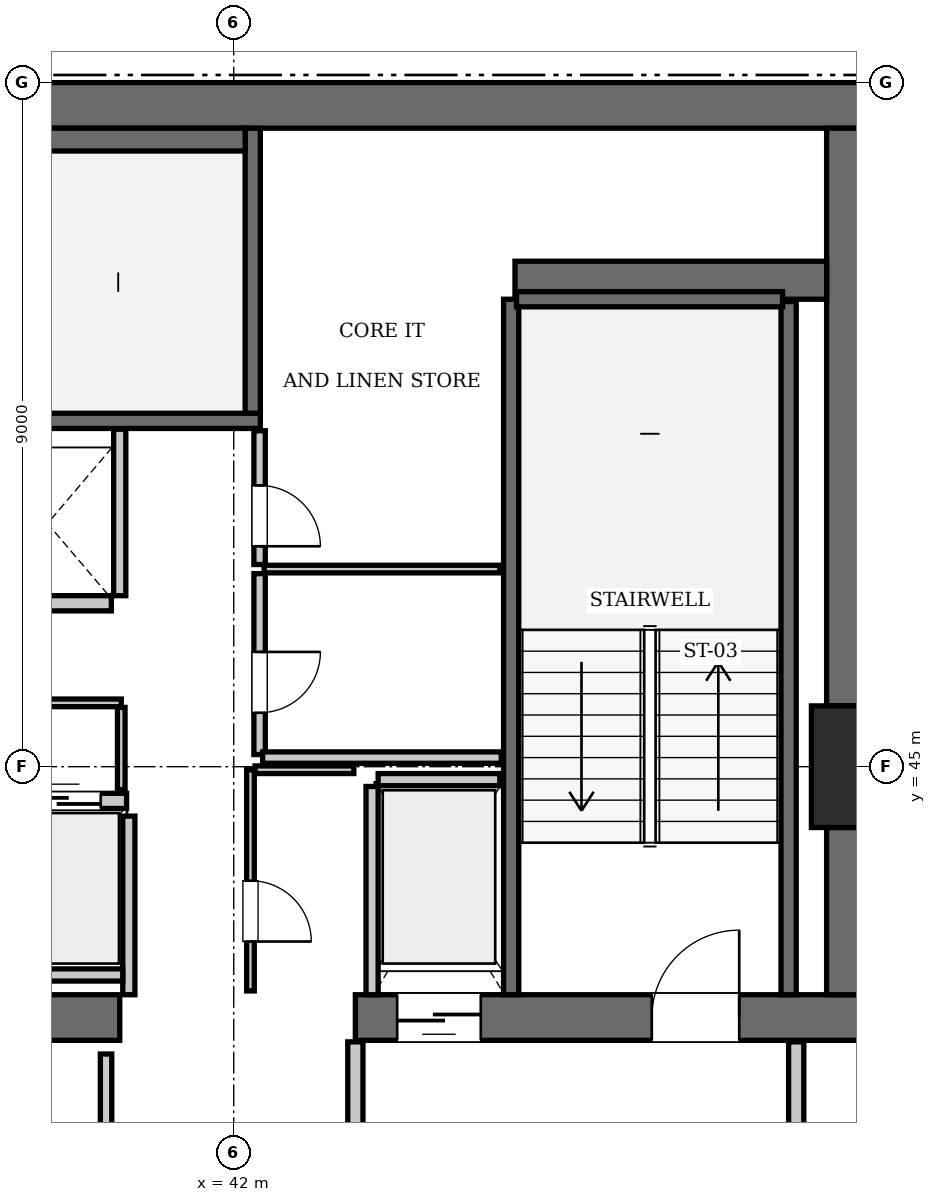
"""IFC4 building model, lengths in metres.
Left out: names, types, materials, properties, quantities, classifications, styles, units other than length and angle.
Written with IfcOpenShell. Run it as: python <this file> out.ifc"""

import sys

from ifc_helpers import new_model, si_unit, direction, frame, frame_2d, origin, origin_2d, place, context, subcontext, project, spatial, rectangle, extrude, element, fill, save


model = new_model("IFC4")
c1 = context("Model", 3, precision=1e-05, world=origin(), true_north=direction((0.0, 1.0)))
c2 = subcontext(c1, "Body", "Model", "MODEL_VIEW")
j1 = project(units=[si_unit("LENGTHUNIT", "METRE"), si_unit("PLANEANGLEUNIT", "RADIAN")], contexts=[c1])
p1 = place(None, origin())
s1 = spatial("IfcSite", under=j1, at=p1, CompositionType="ELEMENT")
p2 = place(p1, origin())
s2 = spatial("IfcBuilding", under=s1, at=p2, CompositionType="ELEMENT")
p3 = place(p2, frame((0.0, 0.0, 301.0)))
s3 = spatial("IfcBuildingStorey", under=s2, at=p3, CompositionType="ELEMENT", Elevation=301.0)
p4 = place(p3, frame((50.4, 45.0, 0.0), z_axis=(0.0, 0.0, 1.0), x_axis=(1.0, 0.0, 0.0)))
e1 = element("IfcColumn", 1, at=p4, inside=s3, PredefinedType="COLUMN", context=c2, shape_type="SweptSolid", body=[
    extrude(rectangle(XDim=1.6, YDim=1.6, at=origin_2d()), origin(), (0.0, 0.0, 1.0), 3.85),
])
p5 = place(p3, frame((25.2, 53.7, 0.0), z_axis=(0.0, 0.0, 1.0), x_axis=(1.0, 0.0, 0.0)))
e2 = element("IfcWall", 2, at=p5, inside=s3, PredefinedType="SHEAR", context=c2, shape_type="SweptSolid", body=[
    extrude(rectangle(XDim=25.2, YDim=0.6, at=frame_2d((12.6, 0.0))), origin(), (0.0, 0.0, 1.0), 3.85),
])
p6 = place(p3, frame((35.1, 41.7, 0.0), z_axis=(0.0, 0.0, 1.0), x_axis=(1.0, 0.0, 0.0)))
e3 = element("IfcWall", 3, at=p6, inside=s3, PredefinedType="SHEAR", context=c2, shape_type="SweptSolid", body=[
    extrude(rectangle(XDim=5.4, YDim=0.6, at=frame_2d((2.7, 0.0))), origin(), (0.0, 0.0, 1.0), 3.85),
])
p7 = place(p3, frame((43.6, 41.7, 0.0), z_axis=(0.0, 0.0, 1.0), x_axis=(1.0, 0.0, 0.0)))
e4 = element("IfcWall", 4, at=p7, inside=s3, PredefinedType="SHEAR", context=c2, shape_type="SweptSolid", body=[
    extrude(rectangle(XDim=6.8, YDim=0.6, at=frame_2d((3.4, 0.0))), origin(), (0.0, 0.0, 1.0), 3.85),
])
p8 = place(p7, frame((3.9, 0.0, 0.0)))
e5 = element("IfcOpeningElement", 5, at=p8, cuts=e4, PredefinedType="OPENING", context=c2, shape_type="SweptSolid", body=[
    extrude(rectangle(XDim=1.15, YDim=2.15, at=frame_2d((0.575, 1.075))), frame((0.0, 0.31, 0.0), z_axis=(0.0, -1.0, 0.0), x_axis=(1.0, 0.0, 0.0)), (0.0, 0.0, 1.0), 0.62),
])
p9 = place(p7, frame((0.55, 0.0, 0.0)))
e6 = element("IfcOpeningElement", 6, at=p9, cuts=e4, PredefinedType="OPENING", context=c2, shape_type="SweptSolid", body=[
    extrude(rectangle(XDim=1.1, YDim=2.2, at=frame_2d((0.55, 1.1))), frame((0.0, 0.31, 0.0), z_axis=(0.0, -1.0, 0.0), x_axis=(1.0, 0.0, 0.0)), (0.0, 0.0, 1.0), 0.62),
])
p10 = place(p3, frame((50.1, 42.0, 0.0), z_axis=(0.0, 0.0, 1.0), x_axis=(0.0, 1.0, 0.0)))
e7 = element("IfcWall", 7, at=p10, inside=s3, PredefinedType="SHEAR", context=c2, shape_type="SweptSolid", body=[
    extrude(rectangle(XDim=2.2, YDim=0.6, at=frame_2d((1.1, 0.0))), origin(), (0.0, 0.0, 1.0), 3.85),
])
p11 = place(p3, frame((50.1, 45.8, 0.0), z_axis=(0.0, 0.0, 1.0), x_axis=(0.0, 1.0, 0.0)))
e8 = element("IfcWall", 8, at=p11, inside=s3, PredefinedType="SHEAR", context=c2, shape_type="SweptSolid", body=[
    extrude(rectangle(XDim=7.6, YDim=0.6, at=frame_2d((3.8, 0.0))), origin(), (0.0, 0.0, 1.0), 3.85),
])
p12 = place(p3, frame((45.7, 51.4, 0.0), z_axis=(0.0, 0.0, 1.0), x_axis=(1.0, 0.0, 0.0)))
e9 = element("IfcWall", 9, at=p12, inside=s3, PredefinedType="SHEAR", context=c2, shape_type="SweptSolid", body=[
    extrude(rectangle(XDim=4.1, YDim=0.5, at=frame_2d((2.05, 0.0))), origin(), (0.0, 0.0, 1.0), 3.85),
])
p13 = place(p3, frame((33.25, 49.55, 0.0), z_axis=(0.0, 0.0, 1.0), x_axis=(1.0, 0.0, 0.0)))
e10 = element("IfcWall", 10, at=p13, inside=s3, PredefinedType="SOLIDWALL", context=c2, shape_type="SweptSolid", body=[
    extrude(rectangle(XDim=9.1, YDim=0.2, at=frame_2d((4.55, 0.0))), origin(), (0.0, 0.0, 1.0), 3.61),
])
p14 = place(p3, frame((42.25, 49.65, 0.0), z_axis=(0.0, 0.0, 1.0), x_axis=(0.0, 1.0, 0.0)))
e11 = element("IfcWall", 11, at=p14, inside=s3, PredefinedType="SOLIDWALL", context=c2, shape_type="SweptSolid", body=[
    extrude(rectangle(XDim=3.75, YDim=0.2, at=frame_2d((1.875, 0.0))), origin(), (0.0, 0.0, 1.0), 3.61),
])
p15 = place(p3, frame((33.45, 53.25, 0.0), z_axis=(0.0, 0.0, 1.0), x_axis=(1.0, 0.0, 0.0)))
e12 = element("IfcWall", 12, at=p15, inside=s3, PredefinedType="SOLIDWALL", context=c2, shape_type="SweptSolid", body=[
    extrude(rectangle(XDim=8.7, YDim=0.3, at=frame_2d((4.35, 0.0))), origin(), (0.0, 0.0, 1.0), 3.61),
])
p16 = place(p3, frame((45.65, 42.0, 0.0), z_axis=(0.0, 0.0, 1.0), x_axis=(0.0, 1.0, 0.0)))
e13 = element("IfcWall", 13, at=p16, inside=s3, PredefinedType="SOLIDWALL", context=c2, shape_type="SweptSolid", body=[
    extrude(rectangle(XDim=9.15, YDim=0.2, at=frame_2d((4.575, 0.0))), origin(), (0.0, 0.0, 1.0), 3.61),
])
p17 = place(p3, frame((49.3, 42.0, 0.0), z_axis=(0.0, 0.0, 1.0), x_axis=(0.0, 1.0, 0.0)))
e14 = element("IfcWall", 14, at=p17, inside=s3, PredefinedType="SOLIDWALL", context=c2, shape_type="SweptSolid", body=[
    extrude(rectangle(XDim=9.12, YDim=0.2, at=frame_2d((4.56, 0.0))), origin(), (0.0, 0.0, 1.0), 3.61),
])
p18 = place(p3, frame((45.72, 51.15, 0.0), z_axis=(0.0, 0.0, 1.0), x_axis=(1.0, 0.0, 0.0)))
e15 = element("IfcWall", 15, at=p18, inside=s3, PredefinedType="SOLIDWALL", context=c2, shape_type="SweptSolid", body=[
    extrude(rectangle(XDim=3.5, YDim=0.2, at=frame_2d((1.75, 0.0))), origin(), (0.0, 0.0, 1.0), 3.61),
])
p19 = place(p3, frame((38.91, 44.55, 0.0), z_axis=(0.0, 0.0, 1.0), x_axis=(1.0, 0.0, 0.0)))
e16 = element("IfcWall", 16, at=p19, inside=s3, PredefinedType="SOLIDWALL", context=c2, shape_type="SweptSolid", body=[
    extrude(rectangle(XDim=1.68, YDim=0.2, at=frame_2d((0.84, 0.0))), origin(), (0.0, 0.0, 1.0), 3.61),
])
p20 = place(p19, frame((0.34, 0.0, 0.0)))
e17 = element("IfcOpeningElement", 17, at=p20, cuts=e16, PredefinedType="OPENING", context=c2, shape_type="SweptSolid", body=[
    extrude(rectangle(XDim=1.0, YDim=2.15, at=frame_2d((0.5, 1.075))), frame((0.0, 0.11, 0.0), z_axis=(0.0, -1.0, 0.0), x_axis=(1.0, 0.0, 0.0)), (0.0, 0.0, 1.0), 0.22),
])
p21 = place(p3, frame((38.71, 47.15, 0.0), z_axis=(0.0, 0.0, 1.0), x_axis=(1.0, 0.0, 0.0)))
e18 = element("IfcWall", 18, at=p21, inside=s3, PredefinedType="SOLIDWALL", context=c2, shape_type="SweptSolid", body=[
    extrude(rectangle(XDim=1.68, YDim=0.2, at=frame_2d((0.84, 0.0))), origin(), (0.0, 0.0, 1.0), 3.61),
])
p22 = place(p3, frame((43.9, 44.83, 0.0), z_axis=(0.0, 0.0, 1.0), x_axis=(1.0, 0.0, 0.0)))
e19 = element("IfcWall", 19, at=p22, inside=s3, PredefinedType="SOLIDWALL", context=c2, shape_type="SweptSolid", body=[
    extrude(rectangle(XDim=1.6, YDim=0.16, at=frame_2d((0.8, 0.0))), origin(), (0.0, 0.0, 1.0), 3.61),
])
p23 = place(p3, frame((43.82, 42.0, 0.0), z_axis=(0.0, 0.0, 1.0), x_axis=(0.0, 1.0, 0.0)))
e20 = element("IfcWall", 20, at=p23, inside=s3, PredefinedType="SOLIDWALL", context=c2, shape_type="SweptSolid", body=[
    extrude(rectangle(XDim=2.74, YDim=0.16, at=frame_2d((1.37, 0.0))), origin(), (0.0, 0.0, 1.0), 3.61),
])
p24 = place(p3, frame((40.62, 42.0, 0.0), z_axis=(0.0, 0.0, 1.0), x_axis=(0.0, 1.0, 0.0)))
e21 = element("IfcWall", 21, at=p24, inside=s3, PredefinedType="SOLIDWALL", context=c2, shape_type="SweptSolid", body=[
    extrude(rectangle(XDim=2.35, YDim=0.16, at=frame_2d((1.175, 0.0))), origin(), (0.0, 0.0, 1.0), 3.61),
])
p25 = place(p3, frame((35.52, 42.26, 0.0), z_axis=(0.0, 0.0, 1.0), x_axis=(1.0, 0.0, 0.0)))
e22 = element("IfcWall", 22, at=p25, inside=s3, PredefinedType="SOLIDWALL", context=c2, shape_type="SweptSolid", body=[
    extrude(rectangle(XDim=5.02, YDim=0.16, at=frame_2d((2.51, 0.0))), origin(), (0.0, 0.0, 1.0), 3.61),
])
p26 = place(p3, frame((40.5, 47.25, 0.0), z_axis=(0.0, 0.0, 1.0), x_axis=(0.0, 1.0, 0.0)))
e23 = element("IfcWall", 23, at=p26, inside=s3, PredefinedType="SOLIDWALL", context=c2, shape_type="SweptSolid", body=[
    extrude(rectangle(XDim=2.19, YDim=0.16, at=frame_2d((1.095, 0.0))), origin(), (0.0, 0.0, 1.0), 3.61),
])
for number, where, z_axis, x_axis in (
    (24, (43.6, 38.31, 0.0), (0.0, 0.0, 1.0), (0.0, 1.0, 0.0)),
    (25, (49.4, 38.31, 0.0), (0.0, 0.0, 1.0), (0.0, 1.0, 0.0)),
):
    element("IfcWall", number, at=place(p3, frame(where, z_axis=z_axis, x_axis=x_axis)), inside=s3, PredefinedType="PARTITIONING", context=c2, shape_type="SweptSolid", body=[
        extrude(rectangle(XDim=3.07, YDim=0.2, at=frame_2d((1.535, 0.0))), origin(), (0.0, 0.0, 1.0), 3.61),
    ])
p27 = place(p3, frame((38.02, 45.84, 0.0), z_axis=(0.0, 0.0, 1.0), x_axis=(1.0, 0.0, 0.0)))
e26 = element("IfcWall", 26, at=p27, inside=s3, PredefinedType="PARTITIONING", context=c2, shape_type="SweptSolid", body=[
    extrude(rectangle(XDim=2.5, YDim=0.1, at=frame_2d((1.25, 0.0))), origin(), (0.0, 0.0, 1.0), 3.61),
])
p28 = place(p27, frame((0.75, 0.0, 0.0)))
e27 = element("IfcOpeningElement", 27, at=p28, cuts=e26, PredefinedType="OPENING", context=c2, shape_type="SweptSolid", body=[
    extrude(rectangle(XDim=0.8, YDim=2.05, at=frame_2d((0.4, 1.025))), frame((0.0, 0.06, 0.0), z_axis=(0.0, -1.0, 0.0), x_axis=(1.0, 0.0, 0.0)), (0.0, 0.0, 1.0), 0.12),
])
p29 = place(p3, frame((40.52, 44.7, 0.0), z_axis=(0.0, 0.0, 1.0), x_axis=(0.0, 1.0, 0.0)))
e28 = element("IfcWall", 28, at=p29, inside=s3, PredefinedType="PARTITIONING", context=c2, shape_type="SweptSolid", body=[
    extrude(rectangle(XDim=1.08, YDim=0.1, at=frame_2d((0.54, 0.0))), origin(), (0.0, 0.0, 1.0), 3.61),
])
p30 = place(p3, frame((42.22, 42.05, 0.0), z_axis=(0.0, 0.0, 1.0), x_axis=(0.0, 1.0, 0.0)))
e29 = element("IfcWall", 29, at=p30, inside=s3, PredefinedType="PARTITIONING", context=c2, shape_type="SweptSolid", body=[
    extrude(rectangle(XDim=2.91, YDim=0.1, at=frame_2d((1.455, 0.0))), origin(), (0.0, 0.0, 1.0), 3.61),
])
p31 = place(p30, frame((0.65, 0.0, 0.0)))
e30 = element("IfcOpeningElement", 30, at=p31, cuts=e29, PredefinedType="OPENING", context=c2, shape_type="SweptSolid", body=[
    extrude(rectangle(XDim=0.8, YDim=2.05, at=frame_2d((0.4, 1.025))), frame((0.0, 0.06, 0.0), z_axis=(0.0, -1.0, 0.0), x_axis=(1.0, 0.0, 0.0)), (0.0, 0.0, 1.0), 0.12),
])
p32 = place(p3, frame((42.28, 44.96, 0.0), z_axis=(0.0, 0.0, 1.0), x_axis=(1.0, 0.0, 0.0)))
e31 = element("IfcWall", 31, at=p32, inside=s3, PredefinedType="PARTITIONING", context=c2, shape_type="SweptSolid", body=[
    extrude(rectangle(XDim=1.3, YDim=0.1, at=frame_2d((0.65, 0.0))), origin(), (0.0, 0.0, 1.0), 3.61),
])
p33 = place(p3, frame((42.34, 45.16, 0.0), z_axis=(0.0, 0.0, 1.0), x_axis=(0.0, 1.0, 0.0)))
e32 = element("IfcWall", 32, at=p33, inside=s3, PredefinedType="PARTITIONING", context=c2, shape_type="SweptSolid", body=[
    extrude(rectangle(XDim=2.38, YDim=0.15, at=frame_2d((1.19, 0.0))), origin(), (0.0, 0.0, 1.0), 3.61),
])
p34 = place(p33, frame((0.55, 0.0, 0.0)))
e33 = element("IfcOpeningElement", 33, at=p34, cuts=e32, PredefinedType="OPENING", context=c2, shape_type="SweptSolid", body=[
    extrude(rectangle(XDim=0.8, YDim=2.05, at=frame_2d((0.4, 1.025))), frame((0.0, 0.085, 0.0), z_axis=(0.0, -1.0, 0.0), x_axis=(1.0, 0.0, 0.0)), (0.0, 0.0, 1.0), 0.17),
])
p35 = place(p3, frame((42.34, 47.66, 0.0), z_axis=(0.0, 0.0, 1.0), x_axis=(0.0, 1.0, 0.0)))
e34 = element("IfcWall", 34, at=p35, inside=s3, PredefinedType="PARTITIONING", context=c2, shape_type="SweptSolid", body=[
    extrude(rectangle(XDim=1.76, YDim=0.15, at=frame_2d((0.88, 0.0))), origin(), (0.0, 0.0, 1.0), 3.61),
])
p36 = place(p35, frame((0.24, 0.0, 0.0)))
e35 = element("IfcOpeningElement", 35, at=p36, cuts=e34, PredefinedType="OPENING", context=c2, shape_type="SweptSolid", body=[
    extrude(rectangle(XDim=0.8, YDim=2.05, at=frame_2d((0.4, 1.025))), frame((0.0, 0.085, 0.0), z_axis=(0.0, -1.0, 0.0), x_axis=(1.0, 0.0, 0.0)), (0.0, 0.0, 1.0), 0.17),
])
p37 = place(p3, frame((42.4, 47.6, 0.0), z_axis=(0.0, 0.0, 1.0), x_axis=(1.0, 0.0, 0.0)))
e36 = element("IfcWall", 36, at=p37, inside=s3, PredefinedType="PARTITIONING", context=c2, shape_type="SweptSolid", body=[
    extrude(rectangle(XDim=3.1, YDim=0.1, at=frame_2d((1.55, 0.0))), origin(), (0.0, 0.0, 1.0), 3.61),
])
p38 = place(p3, frame((42.38, 45.12, 0.0), z_axis=(0.0, 0.0, 1.0), x_axis=(1.0, 0.0, 0.0)))
e37 = element("IfcWall", 37, at=p38, inside=s3, PredefinedType="PARTITIONING", context=c2, shape_type="SweptSolid", body=[
    extrude(rectangle(XDim=3.14, YDim=0.15, at=frame_2d((1.57, 0.0))), origin(), (0.0, 0.0, 1.0), 3.61),
])
p39 = place(p3, frame((40.32, 38.38, 0.0), z_axis=(0.0, 0.0, 1.0), x_axis=(0.0, 1.0, 0.0)))
e38 = element("IfcWall", 38, at=p39, inside=s3, PredefinedType="PARTITIONING", context=c2, shape_type="SweptSolid", body=[
    extrude(rectangle(XDim=2.84, YDim=0.15, at=frame_2d((1.42, 0.0))), origin(), (0.0, 0.0, 1.0), 3.61),
])
p40 = place(p8, origin())
e39 = element("IfcDoor", 39, at=p40, inside=s3, OperationType="SINGLE_SWING_RIGHT", PredefinedType="DOOR", context=c2, shape_type="SweptSolid", body=[
    extrude(rectangle(XDim=1.15, YDim=2.15, at=frame_2d((0.575, 1.075))), frame((0.0, 0.025, 0.0), z_axis=(0.0, -1.0, 0.0), x_axis=(1.0, 0.0, 0.0)), (0.0, 0.0, 1.0), 0.05),
])
fill(e5, e39)
p41 = place(p20, origin())
e40 = element("IfcDoor", 40, at=p41, inside=s3, OperationType="SLIDING_TO_LEFT", PredefinedType="DOOR", context=c2, shape_type="SweptSolid", body=[
    extrude(rectangle(XDim=1.0, YDim=2.15, at=frame_2d((0.5, 1.075))), frame((0.0, 0.025, 0.0), z_axis=(0.0, -1.0, 0.0), x_axis=(1.0, 0.0, 0.0)), (0.0, 0.0, 1.0), 0.05),
])
fill(e17, e40)
p42 = place(p9, frame((1.1, 0.0, 0.0), z_axis=(0.0, 0.0, 1.0), x_axis=(-1.0, 0.0, 0.0)))
e41 = element("IfcDoor", 41, at=p42, inside=s3, OperationType="SLIDING_TO_LEFT", PredefinedType="DOOR", context=c2, shape_type="SweptSolid", body=[
    extrude(rectangle(XDim=1.1, YDim=2.2, at=frame_2d((0.55, 1.1))), frame((0.0, 0.025, 0.0), z_axis=(0.0, -1.0, 0.0), x_axis=(1.0, 0.0, 0.0)), (0.0, 0.0, 1.0), 0.05),
])
fill(e6, e41)
p43 = place(p31, frame((0.8, 0.0, 0.0), z_axis=(0.0, 0.0, 1.0), x_axis=(-1.0, 0.0, 0.0)))
e42 = element("IfcDoor", 42, at=p43, inside=s3, OperationType="SINGLE_SWING_RIGHT", PredefinedType="DOOR", context=c2, shape_type="SweptSolid", body=[
    extrude(rectangle(XDim=0.8, YDim=2.05, at=frame_2d((0.4, 1.025))), frame((0.0, 0.025, 0.0), z_axis=(0.0, -1.0, 0.0), x_axis=(1.0, 0.0, 0.0)), (0.0, 0.0, 1.0), 0.05),
])
fill(e30, e42)
p44 = place(p34, frame((0.8, 0.0, 0.0), z_axis=(0.0, 0.0, 1.0), x_axis=(-1.0, 0.0, 0.0)))
e43 = element("IfcDoor", 43, at=p44, inside=s3, OperationType="SINGLE_SWING_LEFT", PredefinedType="DOOR", context=c2, shape_type="SweptSolid", body=[
    extrude(rectangle(XDim=0.8, YDim=2.05, at=frame_2d((0.4, 1.025))), frame((0.0, 0.025, 0.0), z_axis=(0.0, -1.0, 0.0), x_axis=(1.0, 0.0, 0.0)), (0.0, 0.0, 1.0), 0.05),
])
fill(e33, e43)
p45 = place(p36, frame((0.8, 0.0, 0.0), z_axis=(0.0, 0.0, 1.0), x_axis=(-1.0, 0.0, 0.0)))
e44 = element("IfcDoor", 44, at=p45, inside=s3, OperationType="SINGLE_SWING_RIGHT", PredefinedType="DOOR", context=c2, shape_type="SweptSolid", body=[
    extrude(rectangle(XDim=0.8, YDim=2.05, at=frame_2d((0.4, 1.025))), frame((0.0, 0.025, 0.0), z_axis=(0.0, -1.0, 0.0), x_axis=(1.0, 0.0, 0.0)), (0.0, 0.0, 1.0), 0.05),
])
fill(e35, e44)
save(model, sys.argv[1])
